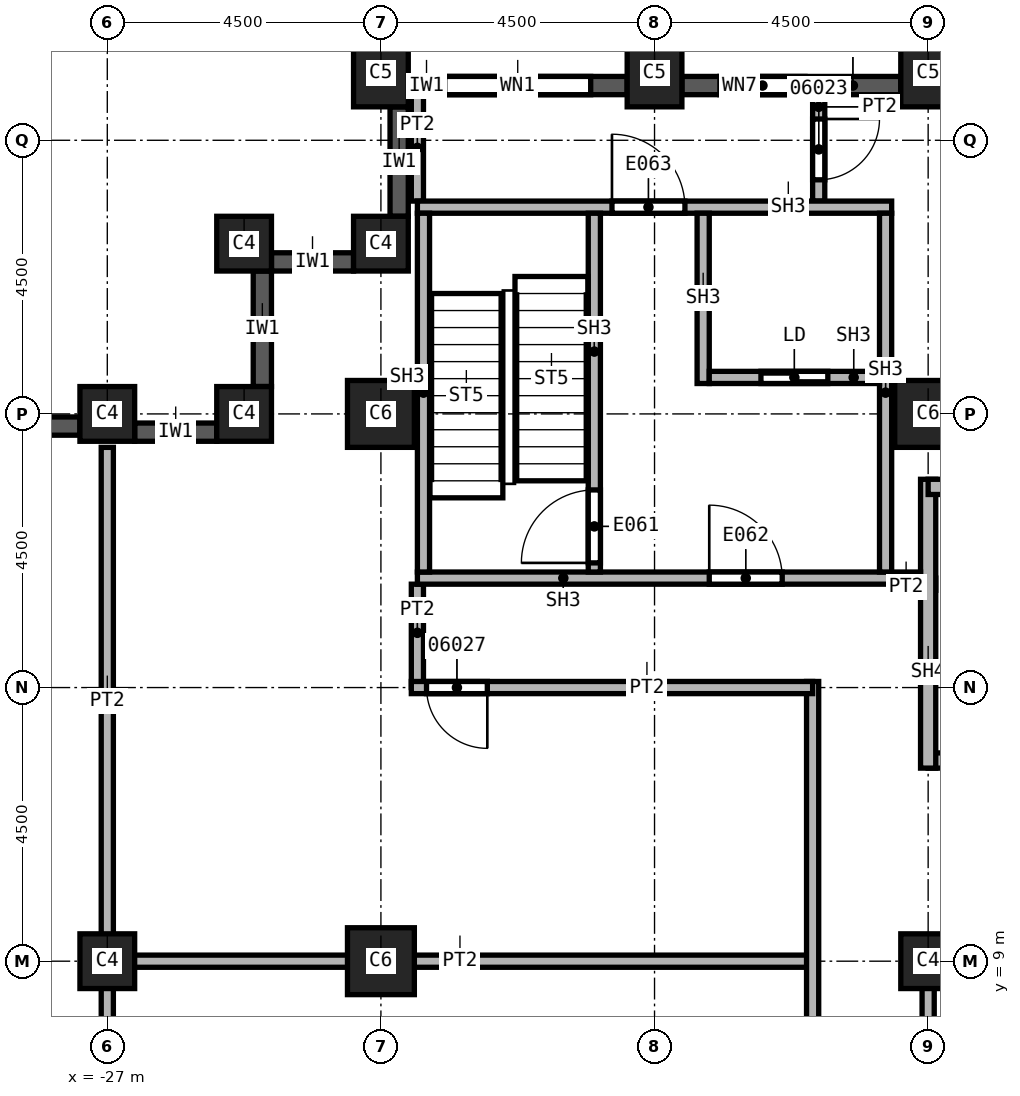
"""IFC4 building model, lengths in metres.
Left out: names, types, materials, properties, quantities, classifications, styles, units other than length and angle.
Written with IfcOpenShell. Run it as: python <this file> out.ifc"""

import sys

from ifc_helpers import new_model, si_unit, direction, frame, frame_2d, origin, origin_2d, place, context, subcontext, project, spatial, rectangle, extrude, element, fill, save


model = new_model("IFC4")
c1 = context("Model", 3, precision=1e-05, world=origin(), true_north=direction((0.0, 1.0)))
c2 = subcontext(c1, "Body", "Model", "MODEL_VIEW")
j1 = project(units=[si_unit("LENGTHUNIT", "METRE"), si_unit("PLANEANGLEUNIT", "RADIAN")], contexts=[c1])
p1 = place(None, origin())
s1 = spatial("IfcSite", under=j1, at=p1, CompositionType="ELEMENT")
p2 = place(p1, origin())
s2 = spatial("IfcBuilding", under=s1, at=p2, CompositionType="ELEMENT")
p3 = place(p2, frame((0.0, 0.0, 126.0)))
s3 = spatial("IfcBuildingStorey", under=s2, at=p3, CompositionType="ELEMENT", Elevation=126.0)
for number, where, z_axis, x_axis in (
    (1, (-13.5, 18.0, 0.0), (0.0, 0.0, 1.0), (1.0, 0.0, 0.0)),
    (2, (-22.5, 9.0, 0.0), (0.0, 0.0, 1.0), (1.0, 0.0, 0.0)),
    (3, (-22.5, 18.0, 0.0), (0.0, 0.0, 1.0), (1.0, 0.0, 0.0)),
):
    element("IfcColumn", number, at=place(p3, frame(where, z_axis=z_axis, x_axis=x_axis)), inside=s3, PredefinedType="COLUMN", context=c2, shape_type="SweptSolid", body=[
        extrude(rectangle(XDim=1.1, YDim=1.1, at=origin_2d()), origin(), (0.0, 0.0, 1.0), 3.7),
    ])
p4 = place(p3, frame((-13.5, 9.0, 0.0), z_axis=(0.0, 0.0, 1.0), x_axis=(1.0, 0.0, 0.0)))
e4 = element("IfcColumn", 4, at=p4, inside=s3, PredefinedType="COLUMN", context=c2, shape_type="SweptSolid", body=[
    extrude(rectangle(XDim=0.9, YDim=0.9, at=origin_2d()), origin(), (0.0, 0.0, 1.0), 3.7),
])
for number, where, z_axis, x_axis in (
    (5, (-13.5, 23.6, 0.0), (0.0, 0.0, 1.0), (1.0, 0.0, 0.0)),
    (6, (-18.0, 23.6, 0.0), (0.0, 0.0, 1.0), (1.0, 0.0, 0.0)),
    (7, (-22.5, 23.6, 0.0), (0.0, 0.0, 1.0), (1.0, 0.0, 0.0)),
):
    element("IfcColumn", number, at=place(p3, frame(where, z_axis=z_axis, x_axis=x_axis)), inside=s3, PredefinedType="COLUMN", context=c2, shape_type="SweptSolid", body=[
        extrude(rectangle(XDim=0.9, YDim=1.1, at=origin_2d()), origin(), (0.0, 0.0, 1.0), 3.7),
    ])
for number, where, z_axis, x_axis in (
    (8, (-27.0, 9.0, 0.0), (0.0, 0.0, 1.0), (1.0, 0.0, 0.0)),
    (9, (-27.0, 18.0, 0.0), (0.0, 0.0, 1.0), (1.0, 0.0, 0.0)),
    (10, (-22.5, 20.8, 0.0), (0.0, 0.0, 1.0), (1.0, 0.0, 0.0)),
    (11, (-24.75, 20.8, 0.0), (0.0, 0.0, 1.0), (1.0, 0.0, 0.0)),
    (12, (-24.75, 18.0, 0.0), (0.0, 0.0, 1.0), (1.0, 0.0, 0.0)),
):
    element("IfcColumn", number, at=place(p3, frame(where, z_axis=z_axis, x_axis=x_axis)), inside=s3, PredefinedType="COLUMN", context=c2, shape_type="SweptSolid", body=[
        extrude(rectangle(XDim=0.9, YDim=0.9, at=origin_2d()), origin(), (0.0, 0.0, 1.0), 3.7),
    ])
p5 = place(p3, frame((-22.2, 23.05, 0.0), z_axis=(0.0, 0.0, 1.0), x_axis=(0.0, -1.0, 0.0)))
e13 = element("IfcWall", 13, at=p5, inside=s3, PredefinedType="SOLIDWALL", context=c2, shape_type="SweptSolid", body=[
    extrude(rectangle(XDim=1.8, YDim=0.3, at=frame_2d((0.9, 0.0))), origin(), (0.0, 0.0, 1.0), 3.1),
])
p6 = place(p3, frame((-22.95, 20.5, 0.0), z_axis=(0.0, 0.0, 1.0), x_axis=(-1.0, 0.0, 0.0)))
e14 = element("IfcWall", 14, at=p6, inside=s3, PredefinedType="SOLIDWALL", context=c2, shape_type="SweptSolid", body=[
    extrude(rectangle(XDim=1.35, YDim=0.3, at=frame_2d((0.675, 0.0))), origin(), (0.0, 0.0, 1.0), 3.1),
])
p7 = place(p3, frame((-24.45, 20.35, 0.0), z_axis=(0.0, 0.0, 1.0), x_axis=(0.0, -1.0, 0.0)))
e15 = element("IfcWall", 15, at=p7, inside=s3, PredefinedType="SOLIDWALL", context=c2, shape_type="SweptSolid", body=[
    extrude(rectangle(XDim=1.9, YDim=0.3, at=frame_2d((0.95, 0.0))), origin(), (0.0, 0.0, 1.0), 3.1),
])
p8 = place(p3, frame((-25.2, 17.7, 0.0), z_axis=(0.0, 0.0, 1.0), x_axis=(-1.0, 0.0, 0.0)))
e16 = element("IfcWall", 16, at=p8, inside=s3, PredefinedType="SOLIDWALL", context=c2, shape_type="SweptSolid", body=[
    extrude(rectangle(XDim=1.35, YDim=0.3, at=frame_2d((0.675, 0.0))), origin(), (0.0, 0.0, 1.0), 3.1),
])
p9 = place(p3, frame((-27.45, 17.8, 0.0), z_axis=(0.0, 0.0, 1.0), x_axis=(-1.0, 0.0, 0.0)))
e17 = element("IfcWall", 17, at=p9, inside=s3, PredefinedType="SOLIDWALL", context=c2, shape_type="SweptSolid", body=[
    extrude(rectangle(XDim=3.6, YDim=0.3, at=frame_2d((1.8, 0.0))), origin(), (0.0, 0.0, 1.0), 3.1),
])
p10 = place(p9, frame((0.6, 0.0, 0.8)))
e18 = element("IfcOpeningElement", 18, at=p10, cuts=e17, PredefinedType="OPENING", context=c2, shape_type="SweptSolid", body=[
    extrude(rectangle(XDim=2.4, YDim=1.95, at=frame_2d((1.2, 0.975))), frame((0.0, 0.15, 0.0), z_axis=(0.0, -1.0, 0.0), x_axis=(1.0, 0.0, 0.0)), (0.0, 0.0, 1.0), 0.3),
])
p11 = place(p3, frame((-13.95, 23.4, 0.0), z_axis=(0.0, 0.0, 1.0), x_axis=(-1.0, 0.0, 0.0)))
e19 = element("IfcWall", 19, at=p11, inside=s3, PredefinedType="SOLIDWALL", context=c2, shape_type="SweptSolid", body=[
    extrude(rectangle(XDim=3.6, YDim=0.3, at=frame_2d((1.8, 0.0))), origin(), (0.0, 0.0, 1.0), 3.1),
])
p12 = place(p11, frame((1.575, 0.0, 0.8)))
e20 = element("IfcOpeningElement", 20, at=p12, cuts=e19, PredefinedType="OPENING", context=c2, shape_type="SweptSolid", body=[
    extrude(rectangle(XDim=1.4, YDim=1.95, at=frame_2d((0.7, 0.975))), frame((0.0, 0.15, 0.0), z_axis=(0.0, -1.0, 0.0), x_axis=(1.0, 0.0, 0.0)), (0.0, 0.0, 1.0), 0.3),
])
p13 = place(p3, frame((-18.45, 23.4, 0.0), z_axis=(0.0, 0.0, 1.0), x_axis=(-1.0, 0.0, 0.0)))
e21 = element("IfcWall", 21, at=p13, inside=s3, PredefinedType="SOLIDWALL", context=c2, shape_type="SweptSolid", body=[
    extrude(rectangle(XDim=3.6, YDim=0.3, at=frame_2d((1.8, 0.0))), origin(), (0.0, 0.0, 1.0), 3.1),
])
p14 = place(p13, frame((0.6, 0.0, 0.8)))
e22 = element("IfcOpeningElement", 22, at=p14, cuts=e21, PredefinedType="OPENING", context=c2, shape_type="SweptSolid", body=[
    extrude(rectangle(XDim=2.4, YDim=1.95, at=frame_2d((1.2, 0.975))), frame((0.0, 0.15, 0.0), z_axis=(0.0, -1.0, 0.0), x_axis=(1.0, 0.0, 0.0)), (0.0, 0.0, 1.0), 0.3),
])
p15 = place(p3, frame((-27.1, 9.0, 0.0), z_axis=(0.0, 0.0, 1.0), x_axis=(1.0, 0.0, 0.0)))
e23 = element("IfcWall", 23, at=p15, inside=s3, PredefinedType="PARTITIONING", context=c2, shape_type="SweptSolid", body=[
    extrude(rectangle(XDim=11.7, YDim=0.2, at=frame_2d((5.85, 0.0))), origin(), (0.0, 0.0, 1.0), 3.7),
])
p16 = place(p3, frame((-27.0, 3.75, 0.0), z_axis=(0.0, 0.0, 1.0), x_axis=(0.0, 1.0, 0.0)))
e24 = element("IfcWall", 24, at=p16, inside=s3, PredefinedType="PARTITIONING", context=c2, shape_type="SweptSolid", body=[
    extrude(rectangle(XDim=13.7, YDim=0.2, at=frame_2d((6.85, 0.0))), origin(), (0.0, 0.0, 1.0), 3.7),
])
p17 = place(p3, frame((-21.9, 13.5, 0.0), z_axis=(0.0, 0.0, 1.0), x_axis=(0.0, 1.0, 0.0)))
e25 = element("IfcWall", 25, at=p17, inside=s3, PredefinedType="PARTITIONING", context=c2, shape_type="SweptSolid", body=[
    extrude(rectangle(XDim=1.7, YDim=0.2, at=frame_2d((0.85, 0.0))), origin(), (0.0, 0.0, 1.0), 3.7),
])
p18 = place(p3, frame((-21.9, 21.5, 0.0), z_axis=(0.0, 0.0, 1.0), x_axis=(0.0, 1.0, 0.0)))
e26 = element("IfcWall", 26, at=p18, inside=s3, PredefinedType="PARTITIONING", context=c2, shape_type="SweptSolid", body=[
    extrude(rectangle(XDim=1.75, YDim=0.2, at=frame_2d((0.875, 0.0))), origin(), (0.0, 0.0, 1.0), 3.7),
])
p19 = place(p3, frame((-15.4, 3.65, 0.0), z_axis=(0.0, 0.0, 1.0), x_axis=(0.0, 1.0, 0.0)))
e27 = element("IfcWall", 27, at=p19, inside=s3, PredefinedType="PARTITIONING", context=c2, shape_type="SweptSolid", body=[
    extrude(rectangle(XDim=9.95, YDim=0.2, at=frame_2d((4.975, 0.0))), origin(), (0.0, 0.0, 1.0), 3.7),
])
p20 = place(p3, frame((-15.4, 13.5, 0.0), z_axis=(0.0, 0.0, 1.0), x_axis=(-1.0, 0.0, 0.0)))
e28 = element("IfcWall", 28, at=p20, inside=s3, PredefinedType="PARTITIONING", context=c2, shape_type="SweptSolid", body=[
    extrude(rectangle(XDim=6.6, YDim=0.2, at=frame_2d((3.3, 0.0))), origin(), (0.0, 0.0, 1.0), 3.7),
])
p21 = place(p20, frame((5.35, 0.0, 0.0)))
e29 = element("IfcOpeningElement", 29, at=p21, cuts=e28, PredefinedType="OPENING", context=c2, shape_type="SweptSolid", body=[
    extrude(rectangle(XDim=1.0, YDim=2.1, at=frame_2d((0.5, 1.05))), frame((0.0, 0.1, 0.0), z_axis=(0.0, -1.0, 0.0), x_axis=(1.0, 0.0, 0.0)), (0.0, 0.0, 1.0), 0.2),
])
p22 = place(p3, frame((-15.3, 23.25, 0.0), z_axis=(0.0, 0.0, 1.0), x_axis=(0.0, -1.0, 0.0)))
e30 = element("IfcWall", 30, at=p22, inside=s3, PredefinedType="PARTITIONING", context=c2, shape_type="SweptSolid", body=[
    extrude(rectangle(XDim=1.75, YDim=0.2, at=frame_2d((0.875, 0.0))), origin(), (0.0, 0.0, 1.0), 3.7),
])
p23 = place(p22, frame((0.4, 0.0, 0.0)))
e31 = element("IfcOpeningElement", 31, at=p23, cuts=e30, PredefinedType="OPENING", context=c2, shape_type="SweptSolid", body=[
    extrude(rectangle(XDim=1.0, YDim=2.1, at=frame_2d((0.5, 1.05))), frame((0.0, 0.1, 0.0), z_axis=(0.0, -1.0, 0.0), x_axis=(1.0, 0.0, 0.0)), (0.0, 0.0, 1.0), 0.2),
])
p24 = place(p3, frame((-14.1, 15.2, 0.0), z_axis=(0.0, 0.0, 1.0), x_axis=(1.0, 0.0, 0.0)))
e32 = element("IfcWall", 32, at=p24, inside=s3, PredefinedType="PARTITIONING", context=c2, shape_type="SweptSolid", body=[
    extrude(rectangle(XDim=0.725, YDim=0.2, at=frame_2d((0.363, 0.0))), origin(), (0.0, 0.0, 1.0), 3.7),
])
p25 = place(p3, frame((-13.5, 5.0, 0.0), z_axis=(0.0, 0.0, 1.0), x_axis=(0.0, 1.0, 0.0)))
e33 = element("IfcWall", 33, at=p25, inside=s3, PredefinedType="SOLIDWALL", context=c2, shape_type="SweptSolid", body=[
    extrude(rectangle(XDim=4.1, YDim=0.2, at=frame_2d((2.05, 0.0))), origin(), (0.0, 0.0, 1.0), 2.938),
])
p26 = place(p3, frame((-13.5, 9.0, 0.0), z_axis=(0.0, 0.0, 1.0), x_axis=(1.0, 0.0, 0.0)))
e34 = element("IfcWall", 34, at=p26, inside=s3, PredefinedType="SOLIDWALL", context=c2, shape_type="SweptSolid", body=[
    extrude(rectangle(XDim=3.0, YDim=0.2, at=frame_2d((1.5, 0.0))), origin(), (0.0, 0.0, 1.0), 2.938),
])
p27 = place(p3, frame((-13.5, 12.3, 0.0), z_axis=(0.0, 0.0, 1.0), x_axis=(1.0, 0.0, 0.0)))
e35 = element("IfcWall", 35, at=p27, inside=s3, PredefinedType="SOLIDWALL", context=c2, shape_type="SweptSolid", body=[
    extrude(rectangle(XDim=9.125, YDim=0.25, at=frame_2d((4.562, 0.0))), origin(), (0.0, 0.0, 1.0), 3.7),
])
p28 = place(p27, frame((0.6, 0.0, 0.0)))
e36 = element("IfcOpeningElement", 36, at=p28, cuts=e35, PredefinedType="OPENING", context=c2, shape_type="SweptSolid", body=[
    extrude(rectangle(XDim=1.2, YDim=2.1, at=frame_2d((0.6, 1.05))), frame((0.0, 0.125, 0.0), z_axis=(0.0, -1.0, 0.0), x_axis=(1.0, 0.0, 0.0)), (0.0, 0.0, 1.0), 0.25),
])
p29 = place(p3, frame((-13.5, 12.175, 0.0), z_axis=(0.0, 0.0, 1.0), x_axis=(0.0, 1.0, 0.0)))
e37 = element("IfcWall", 37, at=p29, inside=s3, PredefinedType="SOLIDWALL", context=c2, shape_type="SweptSolid", body=[
    extrude(rectangle(XDim=4.75, YDim=0.25, at=frame_2d((2.375, 0.0))), origin(), (0.0, 0.0, 1.0), 3.7),
])
p30 = place(p3, frame((-13.5, 16.8, 0.0), z_axis=(0.0, 0.0, 1.0), x_axis=(1.0, 0.0, 0.0)))
e38 = element("IfcWall", 38, at=p30, inside=s3, PredefinedType="SOLIDWALL", context=c2, shape_type="SweptSolid", body=[
    extrude(rectangle(XDim=9.125, YDim=0.25, at=frame_2d((4.562, 0.0))), origin(), (0.0, 0.0, 1.0), 3.7),
])
p31 = place(p3, frame((-21.9, 15.3, 0.0), z_axis=(0.0, 0.0, 1.0), x_axis=(1.0, 0.0, 0.0)))
e39 = element("IfcWall", 39, at=p31, inside=s3, PredefinedType="SOLIDWALL", context=c2, shape_type="SweptSolid", body=[
    extrude(rectangle(XDim=8.275, YDim=0.2, at=frame_2d((4.137, 0.0))), origin(), (0.0, 0.0, 1.0), 3.7),
])
p32 = place(p31, frame((4.8, 0.0, 0.0)))
e40 = element("IfcOpeningElement", 40, at=p32, cuts=e39, PredefinedType="OPENING", context=c2, shape_type="SweptSolid", body=[
    extrude(rectangle(XDim=1.2, YDim=2.1, at=frame_2d((0.6, 1.05))), frame((0.0, 0.1, 0.0), z_axis=(0.0, -1.0, 0.0), x_axis=(1.0, 0.0, 0.0)), (0.0, 0.0, 1.0), 0.2),
])
p33 = place(p3, frame((-21.9, 21.4, 0.0), z_axis=(0.0, 0.0, 1.0), x_axis=(1.0, 0.0, 0.0)))
e41 = element("IfcWall", 41, at=p33, inside=s3, PredefinedType="SOLIDWALL", context=c2, shape_type="SweptSolid", body=[
    extrude(rectangle(XDim=7.8, YDim=0.2, at=frame_2d((3.9, 0.0))), origin(), (0.0, 0.0, 1.0), 3.7),
])
p34 = place(p33, frame((3.2, 0.0, 0.0)))
e42 = element("IfcOpeningElement", 42, at=p34, cuts=e41, PredefinedType="OPENING", context=c2, shape_type="SweptSolid", body=[
    extrude(rectangle(XDim=1.2, YDim=2.1, at=frame_2d((0.6, 1.05))), frame((0.0, 0.1, 0.0), z_axis=(0.0, -1.0, 0.0), x_axis=(1.0, 0.0, 0.0)), (0.0, 0.0, 1.0), 0.2),
])
for number, where, z_axis, x_axis in (
    (43, (-21.8, 15.4, 0.0), (0.0, 0.0, 1.0), (0.0, 1.0, 0.0)),
    (44, (-14.2, 15.4, 0.0), (0.0, 0.0, 1.0), (0.0, 1.0, 0.0)),
):
    element("IfcWall", number, at=place(p3, frame(where, z_axis=z_axis, x_axis=x_axis)), inside=s3, PredefinedType="SOLIDWALL", context=c2, shape_type="SweptSolid", body=[
        extrude(rectangle(XDim=5.9, YDim=0.2, at=frame_2d((2.95, 0.0))), origin(), (0.0, 0.0, 1.0), 3.7),
    ])
p35 = place(p3, frame((-18.99, 15.4, 0.0), z_axis=(0.0, 0.0, 1.0), x_axis=(0.0, 1.0, 0.0)))
e45 = element("IfcWall", 45, at=p35, inside=s3, PredefinedType="SOLIDWALL", context=c2, shape_type="SweptSolid", body=[
    extrude(rectangle(XDim=5.9, YDim=0.2, at=frame_2d((2.95, 0.0))), origin(), (0.0, 0.0, 1.0), 3.7),
])
p36 = place(p35, frame((0.15, 0.0, 0.0)))
e46 = element("IfcOpeningElement", 46, at=p36, cuts=e45, PredefinedType="OPENING", context=c2, shape_type="SweptSolid", body=[
    extrude(rectangle(XDim=1.2, YDim=2.1, at=frame_2d((0.6, 1.05))), frame((0.0, 0.1, 0.0), z_axis=(0.0, -1.0, 0.0), x_axis=(1.0, 0.0, 0.0)), (0.0, 0.0, 1.0), 0.2),
])
p37 = place(p3, frame((-17.2, 18.5, 0.0), z_axis=(0.0, 0.0, 1.0), x_axis=(0.0, 1.0, 0.0)))
e47 = element("IfcWall", 47, at=p37, inside=s3, PredefinedType="SOLIDWALL", context=c2, shape_type="SweptSolid", body=[
    extrude(rectangle(XDim=2.8, YDim=0.2, at=frame_2d((1.4, 0.0))), origin(), (0.0, 0.0, 1.0), 3.7),
])
p38 = place(p3, frame((-17.1, 18.6, 0.0), z_axis=(0.0, 0.0, 1.0), x_axis=(1.0, 0.0, 0.0)))
e48 = element("IfcWall", 48, at=p38, inside=s3, PredefinedType="SOLIDWALL", context=c2, shape_type="SweptSolid", body=[
    extrude(rectangle(XDim=2.8, YDim=0.2, at=frame_2d((1.4, 0.0))), origin(), (0.0, 0.0, 1.0), 3.7),
])
p39 = place(p38, frame((0.85, 0.0, 0.0)))
e49 = element("IfcOpeningElement", 49, at=p39, cuts=e48, PredefinedType="OPENING", context=c2, shape_type="SweptSolid", body=[
    extrude(rectangle(XDim=1.1, YDim=2.1, at=frame_2d((0.55, 1.05))), frame((0.0, 0.1, 0.0), z_axis=(0.0, -1.0, 0.0), x_axis=(1.0, 0.0, 0.0)), (0.0, 0.0, 1.0), 0.2),
])
p40 = place(p14, origin())
e50 = element("IfcWindow", 50, at=p40, inside=s3, PartitioningType="SINGLE_PANEL", PredefinedType="WINDOW", context=c2, shape_type="SweptSolid", body=[
    extrude(rectangle(XDim=2.4, YDim=1.95, at=frame_2d((1.2, 0.975))), frame((0.0, 0.03, 0.0), z_axis=(0.0, -1.0, 0.0), x_axis=(1.0, 0.0, 0.0)), (0.0, 0.0, 1.0), 0.06),
])
fill(e22, e50)
p41 = place(p23, origin())
e51 = element("IfcDoor", 51, at=p41, inside=s3, OperationType="SINGLE_SWING_RIGHT", PredefinedType="DOOR", context=c2, shape_type="SweptSolid", body=[
    extrude(rectangle(XDim=1.0, YDim=2.1, at=frame_2d((0.5, 1.05))), frame((0.0, 0.025, 0.0), z_axis=(0.0, -1.0, 0.0), x_axis=(1.0, 0.0, 0.0)), (0.0, 0.0, 1.0), 0.05),
])
fill(e31, e51)
p42 = place(p21, origin())
e52 = element("IfcDoor", 52, at=p42, inside=s3, OperationType="SINGLE_SWING_RIGHT", PredefinedType="DOOR", context=c2, shape_type="SweptSolid", body=[
    extrude(rectangle(XDim=1.0, YDim=2.1, at=frame_2d((0.5, 1.05))), frame((0.0, 0.025, 0.0), z_axis=(0.0, -1.0, 0.0), x_axis=(1.0, 0.0, 0.0)), (0.0, 0.0, 1.0), 0.05),
])
fill(e29, e52)
p43 = place(p36, origin())
e53 = element("IfcDoor", 53, at=p43, inside=s3, OperationType="SINGLE_SWING_LEFT", PredefinedType="DOOR", context=c2, shape_type="SweptSolid", body=[
    extrude(rectangle(XDim=1.2, YDim=2.1, at=frame_2d((0.6, 1.05))), frame((0.0, 0.025, 0.0), z_axis=(0.0, -1.0, 0.0), x_axis=(1.0, 0.0, 0.0)), (0.0, 0.0, 1.0), 0.05),
])
fill(e46, e53)
p44 = place(p39, origin())
e54 = element("IfcDoor", 54, at=p44, inside=s3, OperationType="SLIDING_TO_LEFT", PredefinedType="DOOR", context=c2, shape_type="SweptSolid", body=[
    extrude(rectangle(XDim=1.1, YDim=2.1, at=frame_2d((0.55, 1.05))), frame((0.0, 0.025, 0.0), z_axis=(0.0, -1.0, 0.0), x_axis=(1.0, 0.0, 0.0)), (0.0, 0.0, 1.0), 0.05),
])
fill(e49, e54)
p45 = place(p32, origin())
e55 = element("IfcDoor", 55, at=p45, inside=s3, OperationType="SINGLE_SWING_RIGHT", PredefinedType="DOOR", context=c2, shape_type="SweptSolid", body=[
    extrude(rectangle(XDim=1.2, YDim=2.1, at=frame_2d((0.6, 1.05))), frame((0.0, 0.025, 0.0), z_axis=(0.0, -1.0, 0.0), x_axis=(1.0, 0.0, 0.0)), (0.0, 0.0, 1.0), 0.05),
])
fill(e40, e55)
p46 = place(p34, origin())
e56 = element("IfcDoor", 56, at=p46, inside=s3, OperationType="SINGLE_SWING_LEFT", PredefinedType="DOOR", context=c2, shape_type="SweptSolid", body=[
    extrude(rectangle(XDim=1.2, YDim=2.1, at=frame_2d((0.6, 1.05))), frame((0.0, 0.025, 0.0), z_axis=(0.0, -1.0, 0.0), x_axis=(1.0, 0.0, 0.0)), (0.0, 0.0, 1.0), 0.05),
])
fill(e42, e56)
p47 = place(p12, origin())
e57 = element("IfcWindow", 57, at=p47, inside=s3, PartitioningType="SINGLE_PANEL", PredefinedType="WINDOW", context=c2, shape_type="SweptSolid", body=[
    extrude(rectangle(XDim=1.4, YDim=1.95, at=frame_2d((0.7, 0.975))), frame((0.0, 0.03, 0.0), z_axis=(0.0, -1.0, 0.0), x_axis=(1.0, 0.0, 0.0)), (0.0, 0.0, 1.0), 0.06),
])
fill(e20, e57)
save(model, sys.argv[1])
